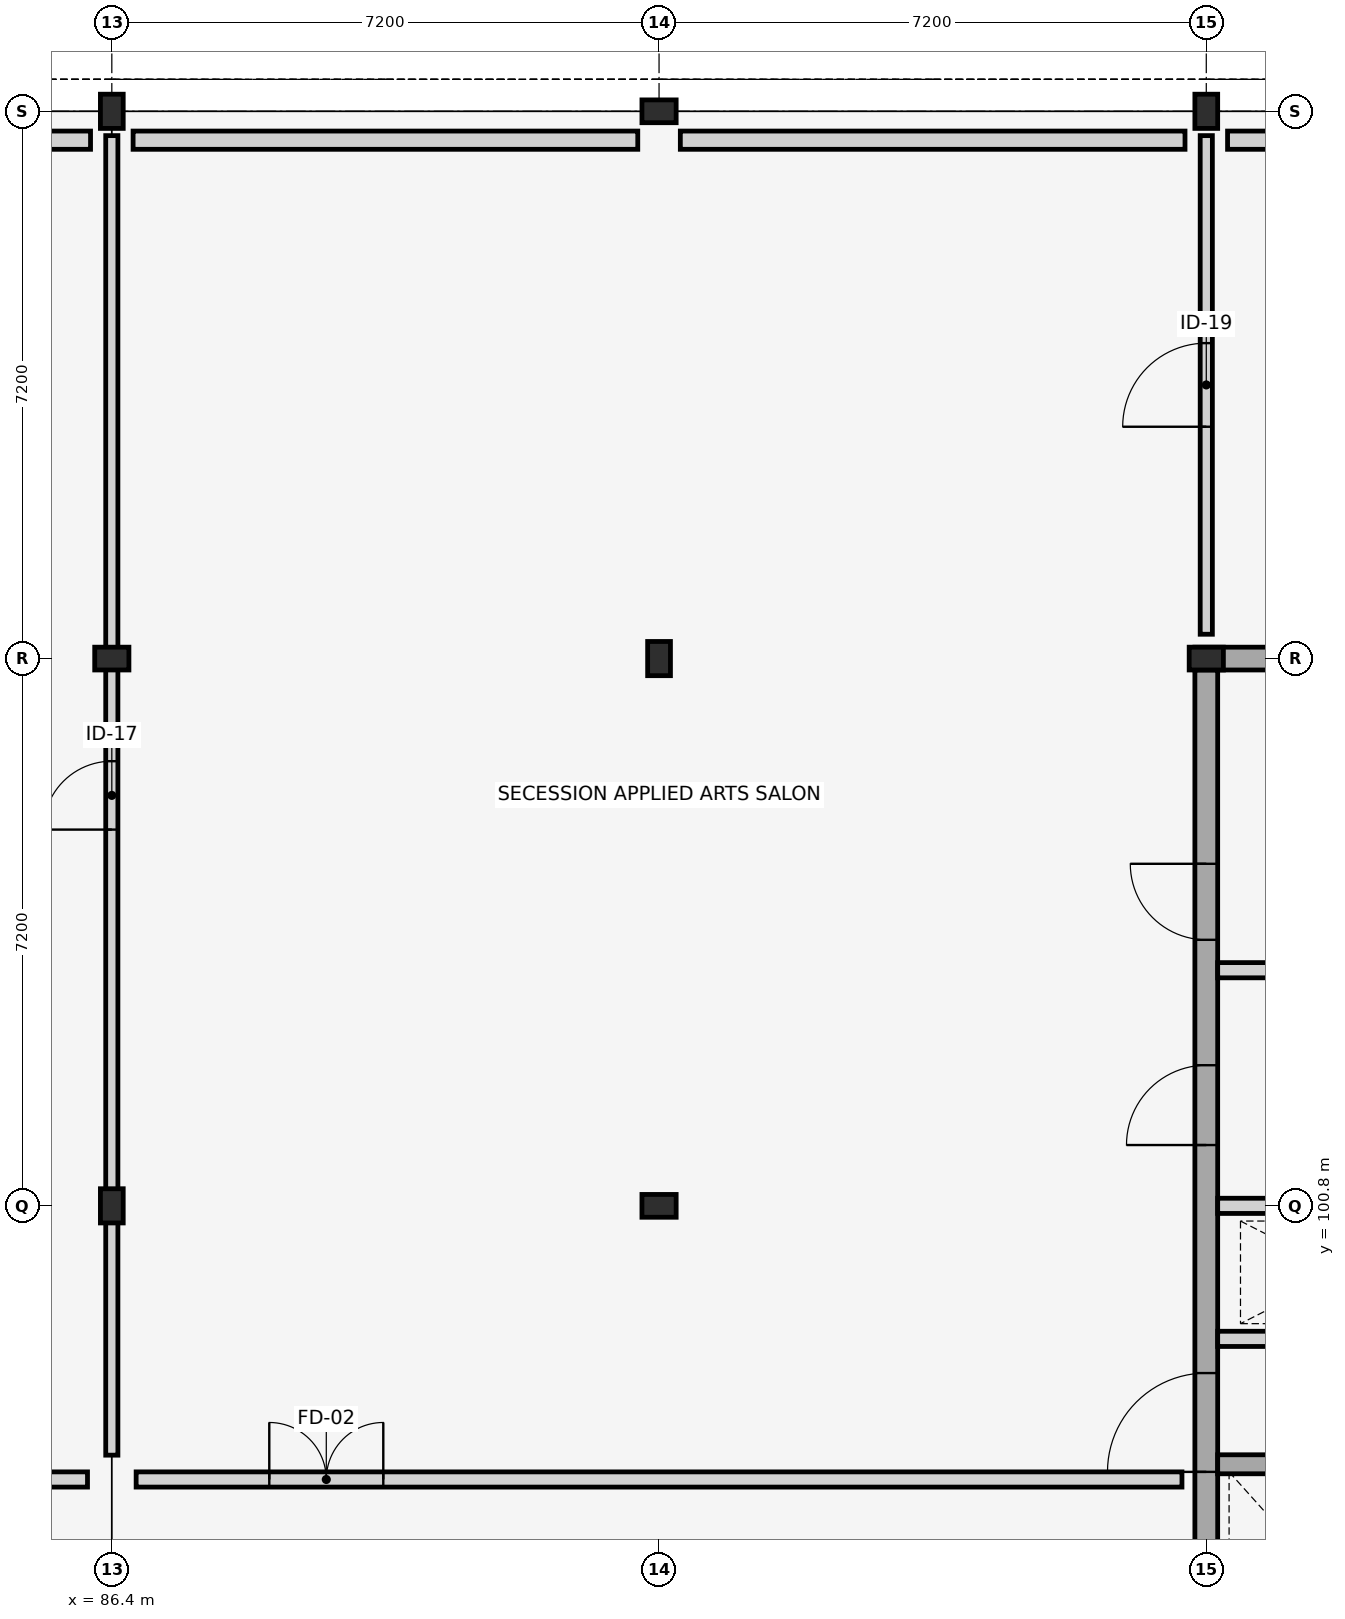
"""IFC4 building model, lengths in metres.
Left out: names, types, materials, properties, quantities, classifications, styles, units other than length and angle.
Written with IfcOpenShell. Run it as: python <this file> out.ifc"""

import sys

from ifc_helpers import new_model, si_unit, direction, frame, frame_2d, origin, origin_2d, place, context, subcontext, project, spatial, rectangle, i_section, extrude, element, fill, save


model = new_model("IFC4")
c1 = context("Model", 3, precision=1e-05, world=origin(), true_north=direction((0.0, 1.0)))
c2 = subcontext(c1, "Body", "Model", "MODEL_VIEW")
j1 = project(units=[si_unit("LENGTHUNIT", "METRE"), si_unit("PLANEANGLEUNIT", "RADIAN")], contexts=[c1])
p1 = place(None, origin())
s1 = spatial("IfcSite", under=j1, at=p1, CompositionType="ELEMENT")
p2 = place(p1, origin())
s2 = spatial("IfcBuilding", under=s1, at=p2, CompositionType="ELEMENT")
p3 = place(p2, frame((0.0, 0.0, 4.5)))
s3 = spatial("IfcBuildingStorey", under=s2, at=p3, CompositionType="ELEMENT", Elevation=4.5)
for number, where, z_axis, x_axis in (
    (1, (86.4, 100.8, 0.0), (0.0, 0.0, 1.0), (1.0, 0.0, 0.0)),
    (2, (86.4, 108.0, 0.0), (0.0, 0.0, 1.0), (0.0, 1.0, 0.0)),
    (3, (86.4, 115.2, 0.0), (0.0, 0.0, 1.0), (1.0, 0.0, 0.0)),
    (4, (93.6, 100.8, 0.0), (0.0, 0.0, 1.0), (0.0, 1.0, 0.0)),
    (5, (93.6, 108.0, 0.0), (0.0, 0.0, 1.0), (1.0, 0.0, 0.0)),
    (6, (93.6, 115.2, 0.0), (0.0, 0.0, 1.0), (0.0, 1.0, 0.0)),
    (7, (100.8, 108.0, 0.0), (0.0, 0.0, 1.0), (0.0, 1.0, 0.0)),
    (8, (100.8, 115.2, 0.0), (0.0, 0.0, 1.0), (1.0, 0.0, 0.0)),
):
    element("IfcColumn", number, at=place(p3, frame(where, z_axis=z_axis, x_axis=x_axis)), inside=s3, PredefinedType="COLUMN", context=c2, shape_type="SweptSolid", body=[
        extrude(i_section(OverallWidth=0.3, OverallDepth=0.45, WebThickness=0.014, FlangeThickness=0.026, FilletRadius=0.027, at=origin_2d()), origin(), (0.0, 0.0, 1.0), 4.2),
    ])
p4 = place(p3, frame((107.72, 114.82, 0.0), z_axis=(0.0, 0.0, 1.0), x_axis=(-1.0, 0.0, 0.0)))
e9 = element("IfcWall", 9, at=p4, inside=s3, PredefinedType="STANDARD", context=c2, shape_type="SweptSolid", body=[
    extrude(rectangle(XDim=6.64, YDim=0.24, at=frame_2d((3.32, 0.0))), origin(), (0.0, 0.0, 1.0), 3.58),
])
for number, where, z_axis, x_axis in (
    (10, (100.52, 114.82, 0.0), (0.0, 0.0, 1.0), (-1.0, 0.0, 0.0)),
    (11, (93.32, 114.82, 0.0), (0.0, 0.0, 1.0), (-1.0, 0.0, 0.0)),
    (12, (86.12, 114.82, 0.0), (0.0, 0.0, 1.0), (-1.0, 0.0, 0.0)),
):
    element("IfcWall", number, at=place(p3, frame(where, z_axis=z_axis, x_axis=x_axis)), inside=s3, PredefinedType="STANDARD", context=c2, shape_type="SweptSolid", body=[
        extrude(rectangle(XDim=6.64, YDim=0.24, at=frame_2d((3.32, 0.0))), origin(), (0.0, 0.0, 1.0), 3.58),
    ])
p5 = place(p3, frame((100.65, 108.0, 0.0), z_axis=(0.0, 0.0, 1.0), x_axis=(1.0, 0.0, 0.0)))
e13 = element("IfcWall", 13, at=p5, inside=s3, PredefinedType="SHEAR", context=c2, shape_type="SweptSolid", body=[
    extrude(rectangle(XDim=7.35, YDim=0.3, at=frame_2d((3.675, 0.0))), origin(), (0.0, 0.0, 1.0), 3.98),
])
p6 = place(p3, frame((100.8, 93.75, 0.0), z_axis=(0.0, 0.0, 1.0), x_axis=(0.0, 1.0, 0.0)))
e14 = element("IfcWall", 14, at=p6, inside=s3, PredefinedType="SHEAR", context=c2, shape_type="SweptSolid", body=[
    extrude(rectangle(XDim=14.1, YDim=0.3, at=frame_2d((7.05, 0.0))), origin(), (0.0, 0.0, 1.0), 3.98),
])
p7 = place(p6, frame((3.55, 0.0, 0.0)))
e15 = element("IfcOpeningElement", 15, at=p7, cuts=e14, PredefinedType="OPENING", context=c2, shape_type="SweptSolid", body=[
    extrude(rectangle(XDim=1.3, YDim=2.2, at=frame_2d((0.65, 1.1))), frame((0.0, 0.16, 0.0), z_axis=(0.0, -1.0, 0.0), x_axis=(1.0, 0.0, 0.0)), (0.0, 0.0, 1.0), 0.32),
])
p8 = place(p6, frame((7.85, 0.0, 0.0)))
e16 = element("IfcOpeningElement", 16, at=p8, cuts=e14, PredefinedType="OPENING", context=c2, shape_type="SweptSolid", body=[
    extrude(rectangle(XDim=1.05, YDim=2.15, at=frame_2d((0.525, 1.075))), frame((0.0, 0.16, 0.0), z_axis=(0.0, -1.0, 0.0), x_axis=(1.0, 0.0, 0.0)), (0.0, 0.0, 1.0), 0.32),
])
p9 = place(p6, frame((10.55, 0.0, 0.0)))
e17 = element("IfcOpeningElement", 17, at=p9, cuts=e14, PredefinedType="OPENING", context=c2, shape_type="SweptSolid", body=[
    extrude(rectangle(XDim=1.0, YDim=2.15, at=frame_2d((0.5, 1.075))), frame((0.0, 0.16, 0.0), z_axis=(0.0, -1.0, 0.0), x_axis=(1.0, 0.0, 0.0)), (0.0, 0.0, 1.0), 0.32),
])
p10 = place(p3, frame((100.95, 99.05, 0.0), z_axis=(0.0, 0.0, 1.0), x_axis=(1.0, 0.0, 0.0)))
e18 = element("IfcWall", 18, at=p10, inside=s3, PredefinedType="PLUMBINGWALL", context=c2, shape_type="SweptSolid", body=[
    extrude(rectangle(XDim=3.55, YDim=0.2, at=frame_2d((1.775, 0.0))), origin(), (0.0, 0.0, 1.0), 3.4),
])
p11 = place(p10, frame((0.9, 0.0, 0.0)))
e19 = element("IfcOpeningElement", 19, at=p11, cuts=e18, PredefinedType="OPENING", context=c2, shape_type="SweptSolid", body=[
    extrude(rectangle(XDim=0.85, YDim=2.05, at=frame_2d((0.425, 1.025))), frame((0.0, 0.11, 0.0), z_axis=(0.0, -1.0, 0.0), x_axis=(1.0, 0.0, 0.0)), (0.0, 0.0, 1.0), 0.22),
])
p12 = place(p3, frame((100.95, 97.4, 0.0), z_axis=(0.0, 0.0, 1.0), x_axis=(1.0, 0.0, 0.0)))
e20 = element("IfcWall", 20, at=p12, inside=s3, PredefinedType="SHEAR", context=c2, shape_type="SweptSolid", body=[
    extrude(rectangle(XDim=3.375, YDim=0.25, at=frame_2d((1.688, 0.0))), origin(), (0.0, 0.0, 1.0), 3.98),
])
for number, where, z_axis, x_axis in (
    (21, (100.95, 100.8, 0.0), (0.0, 0.0, 1.0), (1.0, 0.0, 0.0)),
    (22, (100.95, 103.9, 0.0), (0.0, 0.0, 1.0), (1.0, 0.0, 0.0)),
):
    element("IfcWall", number, at=place(p3, frame(where, z_axis=z_axis, x_axis=x_axis)), inside=s3, PredefinedType="PLUMBINGWALL", context=c2, shape_type="SweptSolid", body=[
        extrude(rectangle(XDim=3.55, YDim=0.2, at=frame_2d((1.775, 0.0))), origin(), (0.0, 0.0, 1.0), 3.4),
    ])
p13 = place(p3, frame((65.12, 97.2, 0.0), z_axis=(0.0, 0.0, 1.0), x_axis=(1.0, 0.0, 0.0)))
e23 = element("IfcWall", 23, at=p13, inside=s3, PredefinedType="PARTITIONING", context=c2, shape_type="SweptSolid", body=[
    extrude(rectangle(XDim=20.96, YDim=0.2, at=frame_2d((10.48, 0.0))), origin(), (0.0, 0.0, 1.0), 3.15),
])
p14 = place(p13, frame((9.68, 0.0, 0.0)))
e24 = element("IfcOpeningElement", 24, at=p14, cuts=e23, PredefinedType="OPENING", context=c2, shape_type="SweptSolid", body=[
    extrude(rectangle(XDim=1.6, YDim=2.35, at=frame_2d((0.8, 1.175))), frame((0.0, 0.11, 0.0), z_axis=(0.0, -1.0, 0.0), x_axis=(1.0, 0.0, 0.0)), (0.0, 0.0, 1.0), 0.22),
])
p15 = place(p3, frame((86.72, 97.2, 0.0), z_axis=(0.0, 0.0, 1.0), x_axis=(1.0, 0.0, 0.0)))
e25 = element("IfcWall", 25, at=p15, inside=s3, PredefinedType="PARTITIONING", context=c2, shape_type="SweptSolid", body=[
    extrude(rectangle(XDim=13.76, YDim=0.2, at=frame_2d((6.88, 0.0))), origin(), (0.0, 0.0, 1.0), 3.15),
])
p16 = place(p15, frame((1.752, 0.0, 0.0)))
e26 = element("IfcOpeningElement", 26, at=p16, cuts=e25, PredefinedType="OPENING", context=c2, shape_type="SweptSolid", body=[
    extrude(rectangle(XDim=1.5, YDim=2.25, at=frame_2d((0.75, 1.125))), frame((0.0, 0.11, 0.0), z_axis=(0.0, -1.0, 0.0), x_axis=(1.0, 0.0, 0.0)), (0.0, 0.0, 1.0), 0.22),
])
p17 = place(p3, frame((86.4, 97.52, 0.0), z_axis=(0.0, 0.0, 1.0), x_axis=(0.0, 1.0, 0.0)))
e27 = element("IfcWall", 27, at=p17, inside=s3, PredefinedType="PARTITIONING", context=c2, shape_type="SweptSolid", body=[
    extrude(rectangle(XDim=17.36, YDim=0.16, at=frame_2d((8.68, 0.0))), origin(), (0.0, 0.0, 1.0), 3.15),
])
p18 = place(p17, frame((8.23, 0.0, 0.0)))
e28 = element("IfcOpeningElement", 28, at=p18, cuts=e27, PredefinedType="OPENING", context=c2, shape_type="SweptSolid", body=[
    extrude(rectangle(XDim=0.9, YDim=2.1, at=frame_2d((0.45, 1.05))), frame((0.0, 0.09, 0.0), z_axis=(0.0, -1.0, 0.0), x_axis=(1.0, 0.0, 0.0)), (0.0, 0.0, 1.0), 0.18),
])
p19 = place(p3, frame((100.8, 108.32, 0.0), z_axis=(0.0, 0.0, 1.0), x_axis=(0.0, 1.0, 0.0)))
e29 = element("IfcWall", 29, at=p19, inside=s3, PredefinedType="PARTITIONING", context=c2, shape_type="SweptSolid", body=[
    extrude(rectangle(XDim=6.56, YDim=0.16, at=frame_2d((3.28, 0.0))), origin(), (0.0, 0.0, 1.0), 3.15),
])
p20 = place(p19, frame((2.73, 0.0, 0.0)))
e30 = element("IfcOpeningElement", 30, at=p20, cuts=e29, PredefinedType="OPENING", context=c2, shape_type="SweptSolid", body=[
    extrude(rectangle(XDim=1.1, YDim=2.35, at=frame_2d((0.55, 1.175))), frame((0.0, 0.09, 0.0), z_axis=(0.0, -1.0, 0.0), x_axis=(1.0, 0.0, 0.0)), (0.0, 0.0, 1.0), 0.18),
])
p21 = place(p7, origin())
e31 = element("IfcDoor", 31, at=p21, inside=s3, OperationType="SINGLE_SWING_LEFT", PredefinedType="DOOR", context=c2, shape_type="SweptSolid", body=[
    extrude(rectangle(XDim=1.3, YDim=2.2, at=frame_2d((0.65, 1.1))), frame((0.0, 0.025, 0.0), z_axis=(0.0, -1.0, 0.0), x_axis=(1.0, 0.0, 0.0)), (0.0, 0.0, 1.0), 0.05),
])
fill(e15, e31)
p22 = place(p8, origin())
e32 = element("IfcDoor", 32, at=p22, inside=s3, OperationType="SINGLE_SWING_LEFT", PredefinedType="DOOR", context=c2, shape_type="SweptSolid", body=[
    extrude(rectangle(XDim=1.05, YDim=2.15, at=frame_2d((0.525, 1.075))), frame((0.0, 0.025, 0.0), z_axis=(0.0, -1.0, 0.0), x_axis=(1.0, 0.0, 0.0)), (0.0, 0.0, 1.0), 0.05),
])
fill(e16, e32)
p23 = place(p9, origin())
e33 = element("IfcDoor", 33, at=p23, inside=s3, OperationType="SINGLE_SWING_RIGHT", PredefinedType="DOOR", context=c2, shape_type="SweptSolid", body=[
    extrude(rectangle(XDim=1.0, YDim=2.15, at=frame_2d((0.5, 1.075))), frame((0.0, 0.025, 0.0), z_axis=(0.0, -1.0, 0.0), x_axis=(1.0, 0.0, 0.0)), (0.0, 0.0, 1.0), 0.05),
])
fill(e17, e33)
p24 = place(p16, origin())
e34 = element("IfcDoor", 34, at=p24, inside=s3, OperationType="DOUBLE_DOOR_SINGLE_SWING", PredefinedType="DOOR", context=c2, shape_type="SweptSolid", body=[
    extrude(rectangle(XDim=1.5, YDim=2.25, at=frame_2d((0.75, 1.125))), frame((0.0, 0.025, 0.0), z_axis=(0.0, -1.0, 0.0), x_axis=(1.0, 0.0, 0.0)), (0.0, 0.0, 1.0), 0.05),
])
fill(e26, e34)
p25 = place(p18, origin())
e35 = element("IfcDoor", 35, at=p25, inside=s3, OperationType="SINGLE_SWING_LEFT", PredefinedType="DOOR", context=c2, shape_type="SweptSolid", body=[
    extrude(rectangle(XDim=0.9, YDim=2.1, at=frame_2d((0.45, 1.05))), frame((0.0, 0.025, 0.0), z_axis=(0.0, -1.0, 0.0), x_axis=(1.0, 0.0, 0.0)), (0.0, 0.0, 1.0), 0.05),
])
fill(e28, e35)
p26 = place(p20, origin())
e36 = element("IfcDoor", 36, at=p26, inside=s3, OperationType="SINGLE_SWING_LEFT", PredefinedType="DOOR", context=c2, shape_type="SweptSolid", body=[
    extrude(rectangle(XDim=1.1, YDim=2.35, at=frame_2d((0.55, 1.175))), frame((0.0, 0.025, 0.0), z_axis=(0.0, -1.0, 0.0), x_axis=(1.0, 0.0, 0.0)), (0.0, 0.0, 1.0), 0.05),
])
fill(e30, e36)
save(model, sys.argv[1])
